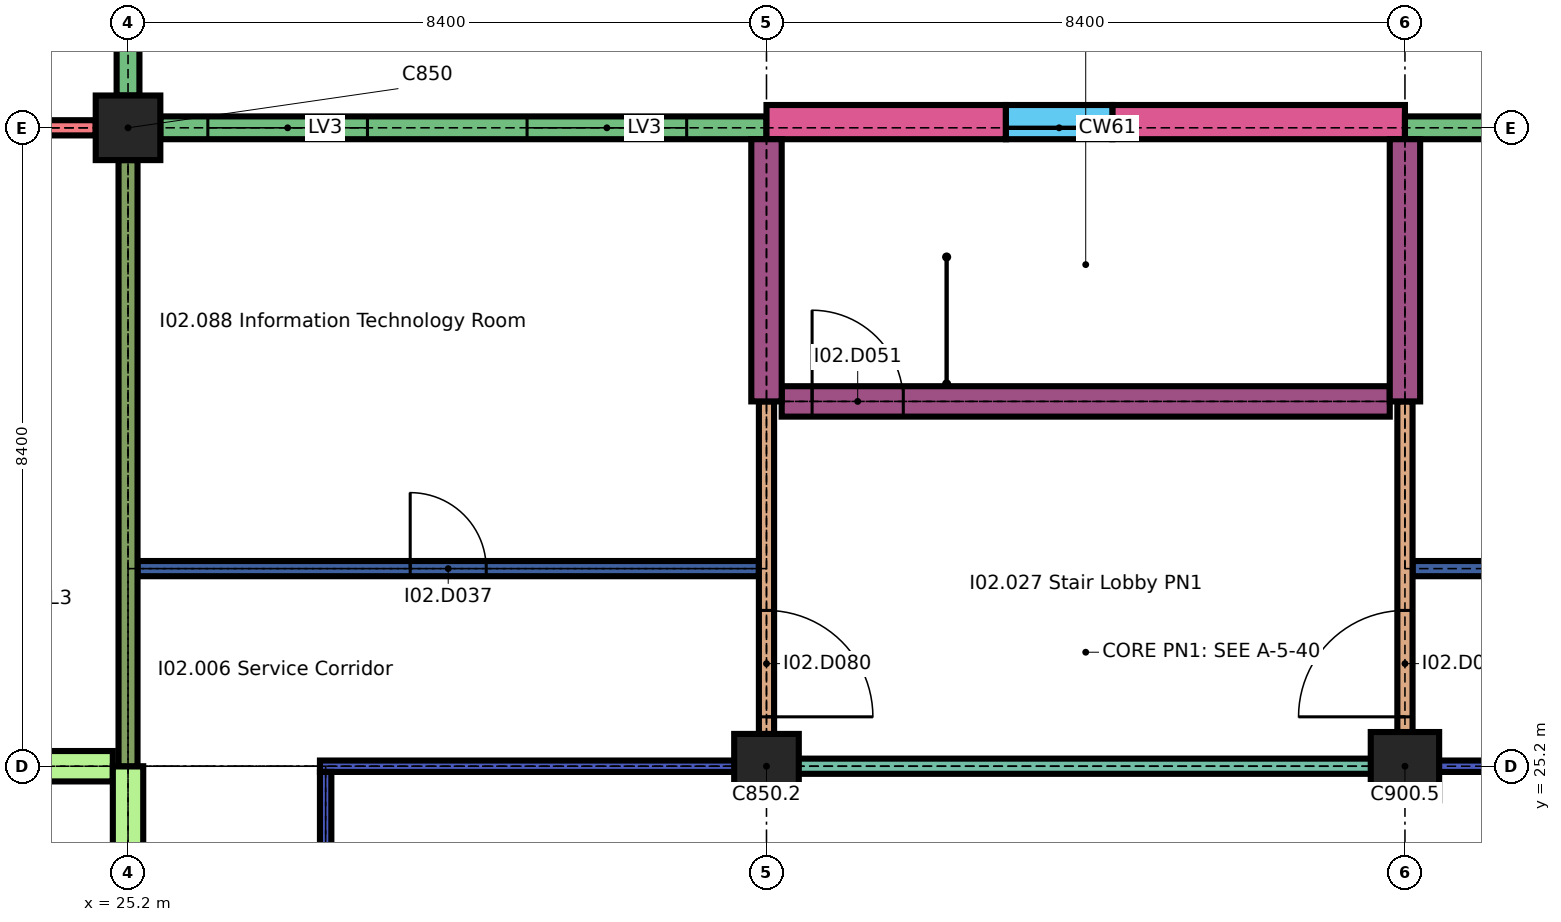
"""IFC4 building model, lengths in metres.
Left out: names, types, materials, properties, quantities, classifications, styles, units other than length and angle.
Written with IfcOpenShell. Run it as: python <this file> out.ifc"""

import sys

from ifc_helpers import new_model, si_unit, direction, frame, frame_2d, origin, origin_2d, place, context, subcontext, project, spatial, rectangle, extrude, element, fill, save


model = new_model("IFC4")
c1 = context("Model", 3, precision=1e-05, world=origin(), true_north=direction((0.0, 1.0)))
c2 = subcontext(c1, "Body", "Model", "MODEL_VIEW")
j1 = project(units=[si_unit("LENGTHUNIT", "METRE"), si_unit("PLANEANGLEUNIT", "RADIAN")], contexts=[c1])
p1 = place(None, origin())
s1 = spatial("IfcSite", under=j1, at=p1, CompositionType="ELEMENT")
p2 = place(p1, origin())
s2 = spatial("IfcBuilding", under=s1, at=p2, CompositionType="ELEMENT")
p3 = place(p2, frame((0.0, 0.0, 12.9)))
s3 = spatial("IfcBuildingStorey", under=s2, at=p3, CompositionType="ELEMENT", Elevation=12.9)
p4 = place(p3, frame((25.2, 33.6, 0.0), z_axis=(0.0, 0.0, 1.0), x_axis=(1.0, 0.0, 0.0)))
e1 = element("IfcColumn", 1, at=p4, inside=s3, PredefinedType="COLUMN", context=c2, shape_type="SweptSolid", body=[
    extrude(rectangle(XDim=0.85, YDim=0.85, at=origin_2d()), origin(), (0.0, 0.0, 1.0), 2.04),
])
p5 = place(p3, frame((25.625, 33.6, 0.0), z_axis=(0.0, 0.0, 1.0), x_axis=(1.0, 0.0, 0.0)))
e2 = element("IfcWall", 2, at=p5, inside=s3, PredefinedType="SOLIDWALL", context=c2, shape_type="SweptSolid", body=[
    extrude(rectangle(XDim=7.975, YDim=0.3, at=frame_2d((3.988, 0.0))), origin(), (0.0, 0.0, 1.0), 1.74),
])
p6 = place(p5, frame((0.625, 0.0, 0.6)))
e3 = element("IfcOpeningElement", 3, at=p6, cuts=e2, PredefinedType="OPENING", context=c2, shape_type="SweptSolid", body=[
    extrude(rectangle(XDim=2.1, YDim=1.05, at=frame_2d((1.05, 0.525))), frame((0.0, 0.16, 0.0), z_axis=(0.0, -1.0, 0.0), x_axis=(1.0, 0.0, 0.0)), (0.0, 0.0, 1.0), 0.32),
])
p7 = place(p5, frame((4.825, 0.0, 0.6)))
e4 = element("IfcOpeningElement", 4, at=p7, cuts=e2, PredefinedType="OPENING", context=c2, shape_type="SweptSolid", body=[
    extrude(rectangle(XDim=2.1, YDim=1.05, at=frame_2d((1.05, 0.525))), frame((0.0, 0.16, 0.0), z_axis=(0.0, -1.0, 0.0), x_axis=(1.0, 0.0, 0.0)), (0.0, 0.0, 1.0), 0.32),
])
p8 = place(p3, frame((33.6, 33.675, 0.0), z_axis=(0.0, 0.0, 1.0), x_axis=(1.0, 0.0, 0.0)))
e5 = element("IfcWall", 5, at=p8, inside=s3, PredefinedType="SOLIDWALL", context=c2, shape_type="SweptSolid", body=[
    extrude(rectangle(XDim=3.15, YDim=0.45, at=frame_2d((1.575, 0.0))), origin(), (0.0, 0.0, 1.0), 2.1),
])
p9 = place(p3, frame((38.15, 33.675, 0.0), z_axis=(0.0, 0.0, 1.0), x_axis=(1.0, 0.0, 0.0)))
e6 = element("IfcWall", 6, at=p9, inside=s3, PredefinedType="SOLIDWALL", context=c2, shape_type="SweptSolid", body=[
    extrude(rectangle(XDim=3.85, YDim=0.45, at=frame_2d((1.925, 0.0))), origin(), (0.0, 0.0, 1.0), 2.1),
])
p10 = place(p3, frame((36.75, 33.675, 0.0), z_axis=(0.0, 0.0, 1.0), x_axis=(1.0, 0.0, 0.0)))
e7 = element("IfcWall", 7, at=p10, inside=s3, PredefinedType="SOLIDWALL", context=c2, shape_type="SweptSolid", body=[
    extrude(rectangle(XDim=1.4, YDim=0.45, at=frame_2d((0.7, 0.0))), origin(), (0.0, 0.0, 1.0), 0.6),
])
p11 = place(p3, frame((42.0, 33.6, 0.0), z_axis=(0.0, 0.0, 1.0), x_axis=(1.0, 0.0, 0.0)))
e8 = element("IfcWall", 8, at=p11, inside=s3, PredefinedType="SOLIDWALL", context=c2, shape_type="SweptSolid", body=[
    extrude(rectangle(XDim=7.975, YDim=0.3, at=frame_2d((3.988, 0.0))), origin(), (0.0, 0.0, 1.0), 1.74),
])
p12 = place(p11, frame((1.05, 0.0, 0.6)))
e9 = element("IfcOpeningElement", 9, at=p12, cuts=e8, PredefinedType="OPENING", context=c2, shape_type="SweptSolid", body=[
    extrude(rectangle(XDim=2.1, YDim=1.05, at=frame_2d((1.05, 0.525))), frame((0.0, 0.16, 0.0), z_axis=(0.0, -1.0, 0.0), x_axis=(1.0, 0.0, 0.0)), (0.0, 0.0, 1.0), 0.32),
])
p13 = place(p11, frame((5.25, 0.0, 0.6)))
e10 = element("IfcOpeningElement", 10, at=p13, cuts=e8, PredefinedType="OPENING", context=c2, shape_type="SweptSolid", body=[
    extrude(rectangle(XDim=2.1, YDim=1.05, at=frame_2d((1.05, 0.525))), frame((0.0, 0.16, 0.0), z_axis=(0.0, -1.0, 0.0), x_axis=(1.0, 0.0, 0.0)), (0.0, 0.0, 1.0), 0.32),
])
p14 = place(p3, frame((25.2, 34.025, 0.0), z_axis=(0.0, 0.0, 1.0), x_axis=(0.0, 1.0, 0.0)))
e11 = element("IfcWall", 11, at=p14, inside=s3, PredefinedType="SOLIDWALL", context=c2, shape_type="SweptSolid", body=[
    extrude(rectangle(XDim=7.975, YDim=0.3, at=frame_2d((3.988, 0.0))), origin(), (0.0, 0.0, 1.0), 1.74),
])
p15 = place(p14, frame((0.625, 0.0, 0.6)))
e12 = element("IfcOpeningElement", 12, at=p15, cuts=e11, PredefinedType="OPENING", context=c2, shape_type="SweptSolid", body=[
    extrude(rectangle(XDim=2.1, YDim=1.05, at=frame_2d((1.05, 0.525))), frame((0.0, 0.16, 0.0), z_axis=(0.0, -1.0, 0.0), x_axis=(1.0, 0.0, 0.0)), (0.0, 0.0, 1.0), 0.32),
])
p16 = place(p14, frame((4.825, 0.0, 0.6)))
e13 = element("IfcOpeningElement", 13, at=p16, cuts=e11, PredefinedType="OPENING", context=c2, shape_type="SweptSolid", body=[
    extrude(rectangle(XDim=2.1, YDim=1.05, at=frame_2d((1.05, 0.525))), frame((0.0, 0.16, 0.0), z_axis=(0.0, -1.0, 0.0), x_axis=(1.0, 0.0, 0.0)), (0.0, 0.0, 1.0), 0.32),
])
p17 = place(p3, frame((17.0, 25.2, 0.0), z_axis=(0.0, 0.0, 1.0), x_axis=(1.0, 0.0, 0.0)))
e14 = element("IfcWall", 14, at=p17, inside=s3, PredefinedType="SHEAR", context=c2, shape_type="SweptSolid", body=[
    extrude(rectangle(XDim=8.0, YDim=0.4, at=frame_2d((4.0, 0.0))), origin(), (0.0, 0.0, 1.0), 2.04),
])
p18 = place(p3, frame((27.725, 25.2, 0.0), z_axis=(0.0, 0.0, 1.0), x_axis=(1.0, 0.0, 0.0)))
e15 = element("IfcWall", 15, at=p18, inside=s3, PredefinedType="PARTITIONING", context=c2, shape_type="SweptSolid", body=[
    extrude(rectangle(XDim=5.875, YDim=0.15, at=frame_2d((2.938, 0.0))), origin(), (0.0, 0.0, 1.0), 2.04),
])
p19 = place(p3, frame((33.6, 25.2, 0.0), z_axis=(0.0, 0.0, 1.0), x_axis=(1.0, 0.0, 0.0)))
e16 = element("IfcWall", 16, at=p19, inside=s3, PredefinedType="PARTITIONING", context=c2, shape_type="SweptSolid", body=[
    extrude(rectangle(XDim=8.4, YDim=0.2, at=frame_2d((4.2, 0.0))), origin(), (0.0, 0.0, 1.0), 2.04),
])
p20 = place(p3, frame((42.0, 25.2, 0.0), z_axis=(0.0, 0.0, 1.0), x_axis=(1.0, 0.0, 0.0)))
e17 = element("IfcWall", 17, at=p20, inside=s3, PredefinedType="PARTITIONING", context=c2, shape_type="SweptSolid", body=[
    extrude(rectangle(XDim=7.95, YDim=0.15, at=frame_2d((3.975, 0.0))), origin(), (0.0, 0.0, 1.0), 2.04),
])
p21 = place(p3, frame((25.325, 27.8, 0.0), z_axis=(0.0, 0.0, 1.0), x_axis=(1.0, 0.0, 0.0)))
e18 = element("IfcWall", 18, at=p21, inside=s3, PredefinedType="SOLIDWALL", context=c2, shape_type="SweptSolid", body=[
    extrude(rectangle(XDim=8.175, YDim=0.2, at=frame_2d((4.087, 0.0))), origin(), (0.0, 0.0, 1.0), 2.1),
])
p22 = place(p21, frame((3.587, 0.0, 0.0)))
e19 = element("IfcOpeningElement", 19, at=p22, cuts=e18, PredefinedType="OPENING", context=c2, shape_type="SweptSolid", body=[
    extrude(rectangle(XDim=1.0, YDim=2.0, at=frame_2d((0.5, 1.0))), frame((0.0, 0.11, 0.0), z_axis=(0.0, -1.0, 0.0), x_axis=(1.0, 0.0, 0.0)), (0.0, 0.0, 1.0), 0.22),
])
p23 = place(p3, frame((42.1, 27.8, 0.0), z_axis=(0.0, 0.0, 1.0), x_axis=(1.0, 0.0, 0.0)))
e20 = element("IfcWall", 20, at=p23, inside=s3, PredefinedType="SOLIDWALL", context=c2, shape_type="SweptSolid", body=[
    extrude(rectangle(XDim=64.1, YDim=0.2, at=frame_2d((32.05, 0.0))), origin(), (0.0, 0.0, 1.0), 2.1),
])
p24 = place(p23, frame((5.55, 0.0, 0.0)))
e21 = element("IfcOpeningElement", 21, at=p24, cuts=e20, PredefinedType="OPENING", context=c2, shape_type="SweptSolid", body=[
    extrude(rectangle(XDim=1.4, YDim=2.0, at=frame_2d((0.7, 1.0))), frame((0.0, 0.11, 0.0), z_axis=(0.0, -1.0, 0.0), x_axis=(1.0, 0.0, 0.0)), (0.0, 0.0, 1.0), 0.22),
])
p25 = place(p23, frame((16.2, 0.0, 0.0)))
e22 = element("IfcOpeningElement", 22, at=p25, cuts=e20, PredefinedType="OPENING", context=c2, shape_type="SweptSolid", body=[
    extrude(rectangle(XDim=1.0, YDim=2.0, at=frame_2d((0.5, 1.0))), frame((0.0, 0.11, 0.0), z_axis=(0.0, -1.0, 0.0), x_axis=(1.0, 0.0, 0.0)), (0.0, 0.0, 1.0), 0.22),
])
p26 = place(p23, frame((24.6, 0.0, 0.0)))
e23 = element("IfcOpeningElement", 23, at=p26, cuts=e20, PredefinedType="OPENING", context=c2, shape_type="SweptSolid", body=[
    extrude(rectangle(XDim=1.0, YDim=2.0, at=frame_2d((0.5, 1.0))), frame((0.0, 0.11, 0.0), z_axis=(0.0, -1.0, 0.0), x_axis=(1.0, 0.0, 0.0)), (0.0, 0.0, 1.0), 0.22),
])
p27 = place(p23, frame((30.9, 0.0, 0.0)))
e24 = element("IfcOpeningElement", 24, at=p27, cuts=e20, PredefinedType="OPENING", context=c2, shape_type="SweptSolid", body=[
    extrude(rectangle(XDim=1.0, YDim=2.0, at=frame_2d((0.5, 1.0))), frame((0.0, 0.11, 0.0), z_axis=(0.0, -1.0, 0.0), x_axis=(1.0, 0.0, 0.0)), (0.0, 0.0, 1.0), 0.22),
])
p28 = place(p23, frame((41.2, 0.0, 0.0)))
e25 = element("IfcOpeningElement", 25, at=p28, cuts=e20, PredefinedType="OPENING", context=c2, shape_type="SweptSolid", body=[
    extrude(rectangle(XDim=1.4, YDim=2.0, at=frame_2d((0.7, 1.0))), frame((0.0, 0.11, 0.0), z_axis=(0.0, -1.0, 0.0), x_axis=(1.0, 0.0, 0.0)), (0.0, 0.0, 1.0), 0.22),
])
p29 = place(p23, frame((54.0, 0.0, 0.0)))
e26 = element("IfcOpeningElement", 26, at=p29, cuts=e20, PredefinedType="OPENING", context=c2, shape_type="SweptSolid", body=[
    extrude(rectangle(XDim=1.0, YDim=2.0, at=frame_2d((0.5, 1.0))), frame((0.0, 0.11, 0.0), z_axis=(0.0, -1.0, 0.0), x_axis=(1.0, 0.0, 0.0)), (0.0, 0.0, 1.0), 0.22),
])
p30 = place(p23, frame((60.9, 0.0, 0.0)))
e27 = element("IfcOpeningElement", 27, at=p30, cuts=e20, PredefinedType="OPENING", context=c2, shape_type="SweptSolid", body=[
    extrude(rectangle(XDim=1.0, YDim=2.0, at=frame_2d((0.5, 1.0))), frame((0.0, 0.11, 0.0), z_axis=(0.0, -1.0, 0.0), x_axis=(1.0, 0.0, 0.0)), (0.0, 0.0, 1.0), 0.22),
])
p31 = place(p3, frame((33.8, 30.0, 0.0), z_axis=(0.0, 0.0, 1.0), x_axis=(1.0, 0.0, 0.0)))
e28 = element("IfcWall", 28, at=p31, inside=s3, PredefinedType="SHEAR", context=c2, shape_type="SweptSolid", body=[
    extrude(rectangle(XDim=8.0, YDim=0.4, at=frame_2d((4.0, 0.0))), origin(), (0.0, 0.0, 1.0), 2.1),
])
p32 = place(p31, frame((0.4, 0.0, 0.0)))
e29 = element("IfcOpeningElement", 29, at=p32, cuts=e28, PredefinedType="OPENING", context=c2, shape_type="SweptSolid", body=[
    extrude(rectangle(XDim=1.2, YDim=2.0, at=frame_2d((0.6, 1.0))), frame((0.0, 0.21, 0.0), z_axis=(0.0, -1.0, 0.0), x_axis=(1.0, 0.0, 0.0)), (0.0, 0.0, 1.0), 0.42),
])
p33 = place(p3, frame((17.225, 33.6, 0.0), z_axis=(0.0, 0.0, 1.0), x_axis=(1.0, 0.0, 0.0)))
e30 = element("IfcWall", 30, at=p33, inside=s3, PredefinedType="SOLIDWALL", context=c2, shape_type="SweptSolid", body=[
    extrude(rectangle(XDim=7.55, YDim=0.2, at=frame_2d((3.775, 0.0))), origin(), (0.0, 0.0, 1.0), 2.04),
])
p34 = place(p3, frame((25.2, 21.6, 0.0), z_axis=(0.0, 0.0, 1.0), x_axis=(0.0, 1.0, 0.0)))
e31 = element("IfcWall", 31, at=p34, inside=s3, PredefinedType="SHEAR", context=c2, shape_type="SweptSolid", body=[
    extrude(rectangle(XDim=3.6, YDim=0.4, at=frame_2d((1.8, 0.0))), origin(), (0.0, 0.0, 1.0), 2.04),
])
p35 = place(p3, frame((25.2, 25.2, 0.0), z_axis=(0.0, 0.0, 1.0), x_axis=(0.0, 1.0, 0.0)))
e32 = element("IfcWall", 32, at=p35, inside=s3, PredefinedType="SOLIDWALL", context=c2, shape_type="SweptSolid", body=[
    extrude(rectangle(XDim=7.975, YDim=0.25, at=frame_2d((3.988, 0.0))), origin(), (0.0, 0.0, 1.0), 2.04),
])
p36 = place(p3, frame((27.8, 11.075, 0.0), z_axis=(0.0, 0.0, 1.0), x_axis=(0.0, 1.0, 0.0)))
e33 = element("IfcWall", 33, at=p36, inside=s3, PredefinedType="PARTITIONING", context=c2, shape_type="SweptSolid", body=[
    extrude(rectangle(XDim=14.05, YDim=0.15, at=frame_2d((7.025, 0.0))), origin(), (0.0, 0.0, 1.0), 2.04),
])
p37 = place(p3, frame((33.6, 25.3, 0.0), z_axis=(0.0, 0.0, 1.0), x_axis=(0.0, 1.0, 0.0)))
e34 = element("IfcWall", 34, at=p37, inside=s3, PredefinedType="PARTITIONING", context=c2, shape_type="SweptSolid", body=[
    extrude(rectangle(XDim=4.7, YDim=0.2, at=frame_2d((2.35, 0.0))), origin(), (0.0, 0.0, 1.0), 2.1),
])
p38 = place(p37, frame((0.55, 0.0, 0.0)))
e35 = element("IfcOpeningElement", 35, at=p38, cuts=e34, PredefinedType="OPENING", context=c2, shape_type="SweptSolid", body=[
    extrude(rectangle(XDim=1.4, YDim=2.0, at=frame_2d((0.7, 1.0))), frame((0.0, 0.11, 0.0), z_axis=(0.0, -1.0, 0.0), x_axis=(1.0, 0.0, 0.0)), (0.0, 0.0, 1.0), 0.22),
])
p39 = place(p3, frame((33.6, 30.0, 0.0), z_axis=(0.0, 0.0, 1.0), x_axis=(0.0, 1.0, 0.0)))
e36 = element("IfcWall", 36, at=p39, inside=s3, PredefinedType="SHEAR", context=c2, shape_type="SweptSolid", body=[
    extrude(rectangle(XDim=3.45, YDim=0.4, at=frame_2d((1.725, 0.0))), origin(), (0.0, 0.0, 1.0), 2.1),
])
p40 = place(p3, frame((42.0, 25.3, 0.0), z_axis=(0.0, 0.0, 1.0), x_axis=(0.0, 1.0, 0.0)))
e37 = element("IfcWall", 37, at=p40, inside=s3, PredefinedType="PARTITIONING", context=c2, shape_type="SweptSolid", body=[
    extrude(rectangle(XDim=4.7, YDim=0.2, at=frame_2d((2.35, 0.0))), origin(), (0.0, 0.0, 1.0), 2.1),
])
p41 = place(p40, frame((0.55, 0.0, 0.0)))
e38 = element("IfcOpeningElement", 38, at=p41, cuts=e37, PredefinedType="OPENING", context=c2, shape_type="SweptSolid", body=[
    extrude(rectangle(XDim=1.4, YDim=2.0, at=frame_2d((0.7, 1.0))), frame((0.0, 0.11, 0.0), z_axis=(0.0, -1.0, 0.0), x_axis=(1.0, 0.0, 0.0)), (0.0, 0.0, 1.0), 0.22),
])
p42 = place(p3, frame((42.0, 30.0, 0.0), z_axis=(0.0, 0.0, 1.0), x_axis=(0.0, 1.0, 0.0)))
e39 = element("IfcWall", 39, at=p42, inside=s3, PredefinedType="SHEAR", context=c2, shape_type="SweptSolid", body=[
    extrude(rectangle(XDim=3.45, YDim=0.4, at=frame_2d((1.725, 0.0))), origin(), (0.0, 0.0, 1.0), 2.1),
])
p43 = place(p3, frame((33.6, 25.2, 0.0), z_axis=(0.0, 0.0, 1.0), x_axis=(1.0, 0.0, 0.0)))
e40 = element("IfcColumn", 40, at=p43, inside=s3, PredefinedType="COLUMN", context=c2, shape_type="SweptSolid", body=[
    extrude(rectangle(XDim=0.85, YDim=0.85, at=origin_2d()), origin(), (0.0, 0.0, 1.0), 2.04),
])
p44 = place(p3, frame((42.0, 25.2, 0.0), z_axis=(0.0, 0.0, 1.0), x_axis=(1.0, 0.0, 0.0)))
e41 = element("IfcColumn", 41, at=p44, inside=s3, PredefinedType="COLUMN", context=c2, shape_type="SweptSolid", body=[
    extrude(rectangle(XDim=0.9, YDim=0.9, at=origin_2d()), origin(), (0.0, 0.0, 1.0), 2.04),
])
p45 = place(p6, origin())
e42 = element("IfcWindow", 42, at=p45, inside=s3, PartitioningType="SINGLE_PANEL", PredefinedType="WINDOW", context=c2, shape_type="SweptSolid", body=[
    extrude(rectangle(XDim=2.1, YDim=1.05, at=frame_2d((1.05, 0.525))), frame((0.0, 0.075, 0.0), z_axis=(0.0, -1.0, 0.0), x_axis=(1.0, 0.0, 0.0)), (0.0, 0.0, 1.0), 0.15),
])
fill(e3, e42)
p46 = place(p7, origin())
e43 = element("IfcWindow", 43, at=p46, inside=s3, PartitioningType="SINGLE_PANEL", PredefinedType="WINDOW", context=c2, shape_type="SweptSolid", body=[
    extrude(rectangle(XDim=2.1, YDim=1.05, at=frame_2d((1.05, 0.525))), frame((0.0, 0.075, 0.0), z_axis=(0.0, -1.0, 0.0), x_axis=(1.0, 0.0, 0.0)), (0.0, 0.0, 1.0), 0.15),
])
fill(e4, e43)
p47 = place(p22, origin())
e44 = element("IfcDoor", 44, at=p47, inside=s3, OperationType="SINGLE_SWING_RIGHT", PredefinedType="DOOR", context=c2, shape_type="SweptSolid", body=[
    extrude(rectangle(XDim=1.0, YDim=2.0, at=frame_2d((0.5, 1.0))), frame((0.0, 0.025, 0.0), z_axis=(0.0, -1.0, 0.0), x_axis=(1.0, 0.0, 0.0)), (0.0, 0.0, 1.0), 0.05),
])
fill(e19, e44)
p48 = place(p32, origin())
e45 = element("IfcDoor", 45, at=p48, inside=s3, OperationType="SINGLE_SWING_RIGHT", PredefinedType="DOOR", context=c2, shape_type="SweptSolid", body=[
    extrude(rectangle(XDim=1.2, YDim=2.0, at=frame_2d((0.6, 1.0))), frame((0.0, 0.025, 0.0), z_axis=(0.0, -1.0, 0.0), x_axis=(1.0, 0.0, 0.0)), (0.0, 0.0, 1.0), 0.05),
])
fill(e29, e45)
p49 = place(p38, origin())
e46 = element("IfcDoor", 46, at=p49, inside=s3, OperationType="SINGLE_SWING_LEFT", PredefinedType="DOOR", context=c2, shape_type="SweptSolid", body=[
    extrude(rectangle(XDim=1.4, YDim=2.0, at=frame_2d((0.7, 1.0))), frame((0.0, 0.03, 0.0), z_axis=(0.0, -1.0, 0.0), x_axis=(1.0, 0.0, 0.0)), (0.0, 0.0, 1.0), 0.06),
])
fill(e35, e46)
p50 = place(p41, origin())
e47 = element("IfcDoor", 47, at=p50, inside=s3, OperationType="SINGLE_SWING_RIGHT", PredefinedType="DOOR", context=c2, shape_type="SweptSolid", body=[
    extrude(rectangle(XDim=1.4, YDim=2.0, at=frame_2d((0.7, 1.0))), frame((0.0, 0.03, 0.0), z_axis=(0.0, -1.0, 0.0), x_axis=(1.0, 0.0, 0.0)), (0.0, 0.0, 1.0), 0.06),
])
fill(e38, e47)
save(model, sys.argv[1])
